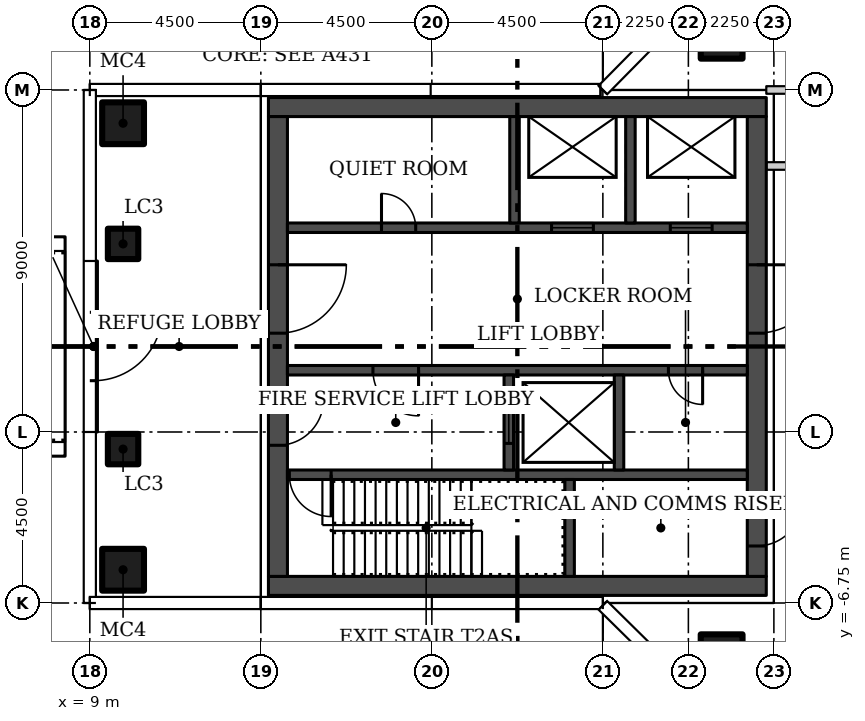
"""IFC4 building model, lengths in metres.
Left out: names, types, materials, properties, quantities, classifications, styles, units other than length and angle.
Written with IfcOpenShell. Run it as: python <this file> out.ifc"""

import sys

from ifc_helpers import new_model, si_unit, direction, frame, frame_2d, origin, origin_2d, place, context, subcontext, project, spatial, rectangle, hollow_rectangle, extrude, element, fill, save


model = new_model("IFC4")
c1 = context("Model", 3, precision=1e-05, world=origin(), true_north=direction((0.0, 1.0)))
c2 = subcontext(c1, "Body", "Model", "MODEL_VIEW")
j1 = project(units=[si_unit("LENGTHUNIT", "METRE"), si_unit("PLANEANGLEUNIT", "RADIAN")], contexts=[c1])
p1 = place(None, origin())
s1 = spatial("IfcSite", under=j1, at=p1, CompositionType="ELEMENT")
p2 = place(p1, origin())
s2 = spatial("IfcBuilding", under=s1, at=p2, CompositionType="ELEMENT")
p3 = place(p2, frame((0.0, 0.0, 177.9)))
s3 = spatial("IfcBuildingStorey", under=s2, at=p3, CompositionType="ELEMENT", Elevation=177.9)
for number, where in (
    (1, (25.625, 8.125, 0.0)),
    (2, (25.625, -8.125, 0.0)),
    (3, (9.875, -5.875, 0.0)),
    (4, (9.875, 5.875, 0.0)),
):
    element("IfcColumn", number, at=place(p3, frame(where)), inside=s3, PredefinedType="COLUMN", context=c2, shape_type="SweptSolid", body=[
        extrude(hollow_rectangle(XDim=1.1, YDim=1.1, WallThickness=0.04, at=origin_2d()), origin(), (0.0, 0.0, 1.0), 4.45),
    ])
for number, where in (
    (5, (9.875, -2.7, 0.0)),
    (6, (9.875, 2.7, 0.0)),
):
    element("IfcColumn", number, at=place(p3, frame(where)), inside=s3, PredefinedType="COLUMN", context=c2, shape_type="SweptSolid", body=[
        extrude(hollow_rectangle(XDim=0.8, YDim=0.8, WallThickness=0.03, at=origin_2d()), origin(), (0.0, 0.0, 1.0), 4.45),
    ])
p4 = place(p3, frame((26.8, 4.75, 0.0)))
e7 = element("IfcWall", 7, at=p4, inside=s3, PredefinedType="PARTITIONING", context=c2, shape_type="SweptSolid", body=[
    extrude(rectangle(XDim=13.9, YDim=0.2, at=frame_2d((6.95, 0.0))), origin(), (0.0, 0.0, 1.0), 4.45),
])
p5 = place(p4, frame((10.25, 0.0, 0.0)))
e8 = element("IfcOpeningElement", 8, at=p5, cuts=e7, PredefinedType="OPENING", context=c2, shape_type="SweptSolid", body=[
    extrude(rectangle(XDim=1.5, YDim=2.4, at=frame_2d((0.75, 1.2))), frame((0.0, 0.11, 0.0), z_axis=(0.0, -1.0, 0.0), x_axis=(1.0, 0.0, 0.0)), (0.0, 0.0, 1.0), 0.22),
])
p6 = place(p4, frame((2.15, 0.0, 0.0)))
e9 = element("IfcOpeningElement", 9, at=p6, cuts=e7, PredefinedType="OPENING", context=c2, shape_type="SweptSolid", body=[
    extrude(rectangle(XDim=1.5, YDim=2.4, at=frame_2d((0.75, 1.2))), frame((0.0, 0.11, 0.0), z_axis=(0.0, -1.0, 0.0), x_axis=(1.0, 0.0, 0.0)), (0.0, 0.0, 1.0), 0.22),
])
p7 = place(p3, frame((26.8, 6.75, 0.0)))
e10 = element("IfcWall", 10, at=p7, inside=s3, PredefinedType="PARTITIONING", context=c2, shape_type="SweptSolid", body=[
    extrude(rectangle(XDim=6.15, YDim=0.2, at=frame_2d((3.075, 0.0))), origin(), (0.0, 0.0, 1.0), 4.45),
])
p8 = place(p7, frame((2.675, 0.0, 0.0)))
e11 = element("IfcOpeningElement", 11, at=p8, cuts=e10, PredefinedType="OPENING", context=c2, shape_type="SweptSolid", body=[
    extrude(rectangle(XDim=0.9, YDim=2.1, at=frame_2d((0.45, 1.05))), frame((0.0, 0.11, 0.0), z_axis=(0.0, -1.0, 0.0), x_axis=(1.0, 0.0, 0.0)), (0.0, 0.0, 1.0), 0.22),
])
p9 = place(p3, frame((9.1, 2.25, 0.0), z_axis=(0.0, 0.0, 1.0), x_axis=(0.0, -1.0, 0.0)))
e12 = element("IfcWall", 12, at=p9, inside=s3, PredefinedType="PARTITIONING", context=c2, shape_type="SweptSolid", body=[
    extrude(rectangle(XDim=4.5, YDim=0.2, at=frame_2d((2.25, 0.0))), origin(), (0.0, 0.0, 1.0), 4.45),
])
p10 = place(p9, frame((1.35, 0.0, 0.0)))
e13 = element("IfcOpeningElement", 13, at=p10, cuts=e12, PredefinedType="OPENING", context=c2, shape_type="SweptSolid", body=[
    extrude(rectangle(XDim=1.8, YDim=2.1, at=frame_2d((0.9, 1.05))), frame((0.0, 0.11, 0.0), z_axis=(0.0, -1.0, 0.0), x_axis=(1.0, 0.0, 0.0)), (0.0, 0.0, 1.0), 0.22),
])
for number, where in (
    (14, (13.7, -6.3, 0.0)),
    (15, (13.7, 6.3, 0.0)),
):
    element("IfcWall", number, at=place(p3, frame(where)), inside=s3, PredefinedType="SHEAR", context=c2, shape_type="SweptSolid", body=[
        extrude(rectangle(XDim=13.1, YDim=0.5, at=frame_2d((6.55, 0.0))), origin(), (0.0, 0.0, 1.0), 4.45),
    ])
p11 = place(p3, frame((13.95, 6.05, 0.0), z_axis=(0.0, 0.0, 1.0), x_axis=(0.0, -1.0, 0.0)))
e16 = element("IfcWall", 16, at=p11, inside=s3, PredefinedType="SHEAR", context=c2, shape_type="SweptSolid", body=[
    extrude(rectangle(XDim=12.1, YDim=0.5, at=frame_2d((6.05, 0.0))), origin(), (0.0, 0.0, 1.0), 4.45),
])
p12 = place(p11, frame((7.45, 0.0, 0.0)))
e17 = element("IfcOpeningElement", 17, at=p12, cuts=e16, PredefinedType="OPENING", context=c2, shape_type="SweptSolid", body=[
    extrude(rectangle(XDim=1.2, YDim=2.1, at=frame_2d((0.6, 1.05))), frame((0.0, 0.26, 0.0), z_axis=(0.0, -1.0, 0.0), x_axis=(1.0, 0.0, 0.0)), (0.0, 0.0, 1.0), 0.52),
])
p13 = place(p11, frame((3.9, 0.0, 0.0)))
e18 = element("IfcOpeningElement", 18, at=p13, cuts=e16, PredefinedType="OPENING", context=c2, shape_type="SweptSolid", body=[
    extrude(rectangle(XDim=1.8, YDim=2.4, at=frame_2d((0.9, 1.2))), frame((0.0, 0.26, 0.0), z_axis=(0.0, -1.0, 0.0), x_axis=(1.0, 0.0, 0.0)), (0.0, 0.0, 1.0), 0.52),
])
p14 = place(p3, frame((26.55, 6.05, 0.0), z_axis=(0.0, 0.0, 1.0), x_axis=(0.0, -1.0, 0.0)))
e19 = element("IfcWall", 19, at=p14, inside=s3, PredefinedType="SHEAR", context=c2, shape_type="SweptSolid", body=[
    extrude(rectangle(XDim=12.1, YDim=0.5, at=frame_2d((6.05, 0.0))), origin(), (0.0, 0.0, 1.0), 4.45),
])
p15 = place(p14, frame((10.1, 0.0, 0.0)))
e20 = element("IfcOpeningElement", 20, at=p15, cuts=e19, PredefinedType="OPENING", context=c2, shape_type="SweptSolid", body=[
    extrude(rectangle(XDim=1.2, YDim=2.1, at=frame_2d((0.6, 1.05))), frame((0.0, 0.26, 0.0), z_axis=(0.0, -1.0, 0.0), x_axis=(1.0, 0.0, 0.0)), (0.0, 0.0, 1.0), 0.52),
])
p16 = place(p14, frame((3.9, 0.0, 0.0)))
e21 = element("IfcOpeningElement", 21, at=p16, cuts=e19, PredefinedType="OPENING", context=c2, shape_type="SweptSolid", body=[
    extrude(rectangle(XDim=1.8, YDim=2.4, at=frame_2d((0.9, 1.2))), frame((0.0, 0.26, 0.0), z_axis=(0.0, -1.0, 0.0), x_axis=(1.0, 0.0, 0.0)), (0.0, 0.0, 1.0), 0.52),
])
p17 = place(p3, frame((26.3, -3.375, 0.0), z_axis=(0.0, 0.0, 1.0), x_axis=(-1.0, 0.0, 0.0)))
e22 = element("IfcWall", 22, at=p17, inside=s3, PredefinedType="SHEAR", context=c2, shape_type="SweptSolid", body=[
    extrude(rectangle(XDim=12.1, YDim=0.25, at=frame_2d((6.05, 0.0))), origin(), (0.0, 0.0, 1.0), 4.45),
])
p18 = place(p17, frame((10.95, 0.0, 0.0)))
e23 = element("IfcOpeningElement", 23, at=p18, cuts=e22, PredefinedType="OPENING", context=c2, shape_type="SweptSolid", body=[
    extrude(rectangle(XDim=1.1, YDim=2.1, at=frame_2d((0.55, 1.05))), frame((0.0, 0.135, 0.0), z_axis=(0.0, -1.0, 0.0), x_axis=(1.0, 0.0, 0.0)), (0.0, 0.0, 1.0), 0.27),
])
p19 = place(p3, frame((21.625, -6.05, 0.0), z_axis=(0.0, 0.0, 1.0), x_axis=(0.0, 1.0, 0.0)))
e24 = element("IfcWall", 24, at=p19, inside=s3, PredefinedType="SHEAR", context=c2, shape_type="SweptSolid", body=[
    extrude(rectangle(XDim=2.55, YDim=0.25, at=frame_2d((1.275, 0.0))), origin(), (0.0, 0.0, 1.0), 4.45),
])
p20 = place(p3, frame((26.3, -0.625, 0.0), z_axis=(0.0, 0.0, 1.0), x_axis=(-1.0, 0.0, 0.0)))
e25 = element("IfcWall", 25, at=p20, inside=s3, PredefinedType="SHEAR", context=c2, shape_type="SweptSolid", body=[
    extrude(rectangle(XDim=12.1, YDim=0.25, at=frame_2d((6.05, 0.0))), origin(), (0.0, 0.0, 1.0), 4.45),
])
p21 = place(p20, frame((8.65, 0.0, 0.0)))
e26 = element("IfcOpeningElement", 26, at=p21, cuts=e25, PredefinedType="OPENING", context=c2, shape_type="SweptSolid", body=[
    extrude(rectangle(XDim=1.2, YDim=2.1, at=frame_2d((0.6, 1.05))), frame((0.0, 0.135, 0.0), z_axis=(0.0, -1.0, 0.0), x_axis=(1.0, 0.0, 0.0)), (0.0, 0.0, 1.0), 0.27),
])
p22 = place(p20, frame((1.175, 0.0, 0.0)))
e27 = element("IfcOpeningElement", 27, at=p22, cuts=e25, PredefinedType="OPENING", context=c2, shape_type="SweptSolid", body=[
    extrude(rectangle(XDim=0.9, YDim=2.1, at=frame_2d((0.45, 1.05))), frame((0.0, 0.135, 0.0), z_axis=(0.0, -1.0, 0.0), x_axis=(1.0, 0.0, 0.0)), (0.0, 0.0, 1.0), 0.27),
])
p23 = place(p3, frame((20.025, -3.25, 0.0), z_axis=(0.0, 0.0, 1.0), x_axis=(0.0, 1.0, 0.0)))
e28 = element("IfcWall", 28, at=p23, inside=s3, PredefinedType="SHEAR", context=c2, shape_type="SweptSolid", body=[
    extrude(rectangle(XDim=2.5, YDim=0.25, at=frame_2d((1.25, 0.0))), origin(), (0.0, 0.0, 1.0), 4.45),
])
p24 = place(p23, frame((0.7, 0.0, 0.0)))
e29 = element("IfcOpeningElement", 29, at=p24, cuts=e28, PredefinedType="OPENING", context=c2, shape_type="SweptSolid", body=[
    extrude(rectangle(XDim=1.1, YDim=2.1, at=frame_2d((0.55, 1.05))), frame((0.0, 0.135, 0.0), z_axis=(0.0, -1.0, 0.0), x_axis=(1.0, 0.0, 0.0)), (0.0, 0.0, 1.0), 0.27),
])
p25 = place(p3, frame((22.925, -3.25, 0.0), z_axis=(0.0, 0.0, 1.0), x_axis=(0.0, 1.0, 0.0)))
e30 = element("IfcWall", 30, at=p25, inside=s3, PredefinedType="SHEAR", context=c2, shape_type="SweptSolid", body=[
    extrude(rectangle(XDim=2.5, YDim=0.25, at=frame_2d((1.25, 0.0))), origin(), (0.0, 0.0, 1.0), 4.45),
])
p26 = place(p3, frame((14.2, 3.125, 0.0)))
e31 = element("IfcWall", 31, at=p26, inside=s3, PredefinedType="SHEAR", context=c2, shape_type="SweptSolid", body=[
    extrude(rectangle(XDim=12.1, YDim=0.25, at=frame_2d((6.05, 0.0))), origin(), (0.0, 0.0, 1.0), 4.45),
])
p27 = place(p26, frame((6.95, 0.0, 0.0)))
e32 = element("IfcOpeningElement", 32, at=p27, cuts=e31, PredefinedType="OPENING", context=c2, shape_type="SweptSolid", body=[
    extrude(rectangle(XDim=1.1, YDim=2.1, at=frame_2d((0.55, 1.05))), frame((0.0, 0.135, 0.0), z_axis=(0.0, -1.0, 0.0), x_axis=(1.0, 0.0, 0.0)), (0.0, 0.0, 1.0), 0.27),
])
p28 = place(p26, frame((10.075, 0.0, 0.0)))
e33 = element("IfcOpeningElement", 33, at=p28, cuts=e31, PredefinedType="OPENING", context=c2, shape_type="SweptSolid", body=[
    extrude(rectangle(XDim=1.1, YDim=2.1, at=frame_2d((0.55, 1.05))), frame((0.0, 0.135, 0.0), z_axis=(0.0, -1.0, 0.0), x_axis=(1.0, 0.0, 0.0)), (0.0, 0.0, 1.0), 0.27),
])
p29 = place(p26, frame((2.475, 0.0, 0.0)))
e34 = element("IfcOpeningElement", 34, at=p29, cuts=e31, PredefinedType="OPENING", context=c2, shape_type="SweptSolid", body=[
    extrude(rectangle(XDim=0.9, YDim=2.1, at=frame_2d((0.45, 1.05))), frame((0.0, 0.135, 0.0), z_axis=(0.0, -1.0, 0.0), x_axis=(1.0, 0.0, 0.0)), (0.0, 0.0, 1.0), 0.27),
])
for number, where, z_axis, x_axis in (
    (35, (20.175, 3.25, 0.0), (0.0, 0.0, 1.0), (0.0, 1.0, 0.0)),
    (36, (23.225, 3.25, 0.0), (0.0, 0.0, 1.0), (0.0, 1.0, 0.0)),
):
    element("IfcWall", number, at=place(p3, frame(where, z_axis=z_axis, x_axis=x_axis)), inside=s3, PredefinedType="SHEAR", context=c2, shape_type="SweptSolid", body=[
        extrude(rectangle(XDim=2.8, YDim=0.25, at=frame_2d((1.4, 0.0))), origin(), (0.0, 0.0, 1.0), 4.45),
    ])
p30 = place(p10, origin())
e37 = element("IfcDoor", 37, at=p30, inside=s3, OperationType="DOUBLE_DOOR_SINGLE_SWING", PredefinedType="DOOR", context=c2, shape_type="SweptSolid", body=[
    extrude(rectangle(XDim=1.8, YDim=2.1, at=frame_2d((0.9, 1.05))), frame((0.0, 0.025, 0.0), z_axis=(0.0, -1.0, 0.0), x_axis=(1.0, 0.0, 0.0)), (0.0, 0.0, 1.0), 0.05),
])
fill(e13, e37)
p31 = place(p12, origin())
e38 = element("IfcDoor", 38, at=p31, inside=s3, OperationType="SINGLE_SWING_RIGHT", PredefinedType="DOOR", context=c2, shape_type="SweptSolid", body=[
    extrude(rectangle(XDim=1.2, YDim=2.1, at=frame_2d((0.6, 1.05))), frame((0.0, 0.025, 0.0), z_axis=(0.0, -1.0, 0.0), x_axis=(1.0, 0.0, 0.0)), (0.0, 0.0, 1.0), 0.05),
])
fill(e17, e38)
p32 = place(p13, origin())
e39 = element("IfcDoor", 39, at=p32, inside=s3, OperationType="DOUBLE_DOOR_SINGLE_SWING", PredefinedType="DOOR", context=c2, shape_type="SweptSolid", body=[
    extrude(rectangle(XDim=1.8, YDim=2.4, at=frame_2d((0.9, 1.2))), frame((0.0, 0.025, 0.0), z_axis=(0.0, -1.0, 0.0), x_axis=(1.0, 0.0, 0.0)), (0.0, 0.0, 1.0), 0.05),
])
fill(e18, e39)
p33 = place(p15, origin())
e40 = element("IfcDoor", 40, at=p33, inside=s3, OperationType="SINGLE_SWING_RIGHT", PredefinedType="DOOR", context=c2, shape_type="SweptSolid", body=[
    extrude(rectangle(XDim=1.2, YDim=2.1, at=frame_2d((0.6, 1.05))), frame((0.0, 0.025, 0.0), z_axis=(0.0, -1.0, 0.0), x_axis=(1.0, 0.0, 0.0)), (0.0, 0.0, 1.0), 0.05),
])
fill(e20, e40)
p34 = place(p16, origin())
e41 = element("IfcDoor", 41, at=p34, inside=s3, OperationType="DOUBLE_DOOR_SINGLE_SWING", PredefinedType="DOOR", context=c2, shape_type="SweptSolid", body=[
    extrude(rectangle(XDim=1.8, YDim=2.4, at=frame_2d((0.9, 1.2))), frame((0.0, 0.025, 0.0), z_axis=(0.0, -1.0, 0.0), x_axis=(1.0, 0.0, 0.0)), (0.0, 0.0, 1.0), 0.05),
])
fill(e21, e41)
p35 = place(p18, origin())
e42 = element("IfcDoor", 42, at=p35, inside=s3, OperationType="SINGLE_SWING_RIGHT", PredefinedType="DOOR", context=c2, shape_type="SweptSolid", body=[
    extrude(rectangle(XDim=1.1, YDim=2.1, at=frame_2d((0.55, 1.05))), frame((0.0, 0.025, 0.0), z_axis=(0.0, -1.0, 0.0), x_axis=(1.0, 0.0, 0.0)), (0.0, 0.0, 1.0), 0.05),
])
fill(e23, e42)
p36 = place(p21, origin())
e43 = element("IfcDoor", 43, at=p36, inside=s3, OperationType="SINGLE_SWING_RIGHT", PredefinedType="DOOR", context=c2, shape_type="SweptSolid", body=[
    extrude(rectangle(XDim=1.2, YDim=2.1, at=frame_2d((0.6, 1.05))), frame((0.0, 0.025, 0.0), z_axis=(0.0, -1.0, 0.0), x_axis=(1.0, 0.0, 0.0)), (0.0, 0.0, 1.0), 0.05),
])
fill(e26, e43)
p37 = place(p22, origin())
e44 = element("IfcDoor", 44, at=p37, inside=s3, OperationType="SINGLE_SWING_LEFT", PredefinedType="DOOR", context=c2, shape_type="SweptSolid", body=[
    extrude(rectangle(XDim=0.9, YDim=2.1, at=frame_2d((0.45, 1.05))), frame((0.0, 0.025, 0.0), z_axis=(0.0, -1.0, 0.0), x_axis=(1.0, 0.0, 0.0)), (0.0, 0.0, 1.0), 0.05),
])
fill(e27, e44)
p38 = place(p24, origin())
e45 = element("IfcDoor", 45, at=p38, inside=s3, OperationType="SLIDING_TO_LEFT", PredefinedType="DOOR", context=c2, shape_type="SweptSolid", body=[
    extrude(rectangle(XDim=1.1, YDim=2.1, at=frame_2d((0.55, 1.05))), frame((0.0, 0.025, 0.0), z_axis=(0.0, -1.0, 0.0), x_axis=(1.0, 0.0, 0.0)), (0.0, 0.0, 1.0), 0.05),
])
fill(e29, e45)
p39 = place(p27, origin())
e46 = element("IfcDoor", 46, at=p39, inside=s3, OperationType="SLIDING_TO_LEFT", PredefinedType="DOOR", context=c2, shape_type="SweptSolid", body=[
    extrude(rectangle(XDim=1.1, YDim=2.1, at=frame_2d((0.55, 1.05))), frame((0.0, 0.025, 0.0), z_axis=(0.0, -1.0, 0.0), x_axis=(1.0, 0.0, 0.0)), (0.0, 0.0, 1.0), 0.05),
])
fill(e32, e46)
p40 = place(p28, origin())
e47 = element("IfcDoor", 47, at=p40, inside=s3, OperationType="SLIDING_TO_LEFT", PredefinedType="DOOR", context=c2, shape_type="SweptSolid", body=[
    extrude(rectangle(XDim=1.1, YDim=2.1, at=frame_2d((0.55, 1.05))), frame((0.0, 0.025, 0.0), z_axis=(0.0, -1.0, 0.0), x_axis=(1.0, 0.0, 0.0)), (0.0, 0.0, 1.0), 0.05),
])
fill(e33, e47)
p41 = place(p29, origin())
e48 = element("IfcDoor", 48, at=p41, inside=s3, OperationType="SINGLE_SWING_LEFT", PredefinedType="DOOR", context=c2, shape_type="SweptSolid", body=[
    extrude(rectangle(XDim=0.9, YDim=2.1, at=frame_2d((0.45, 1.05))), frame((0.0, 0.025, 0.0), z_axis=(0.0, -1.0, 0.0), x_axis=(1.0, 0.0, 0.0)), (0.0, 0.0, 1.0), 0.05),
])
fill(e34, e48)
save(model, sys.argv[1])
